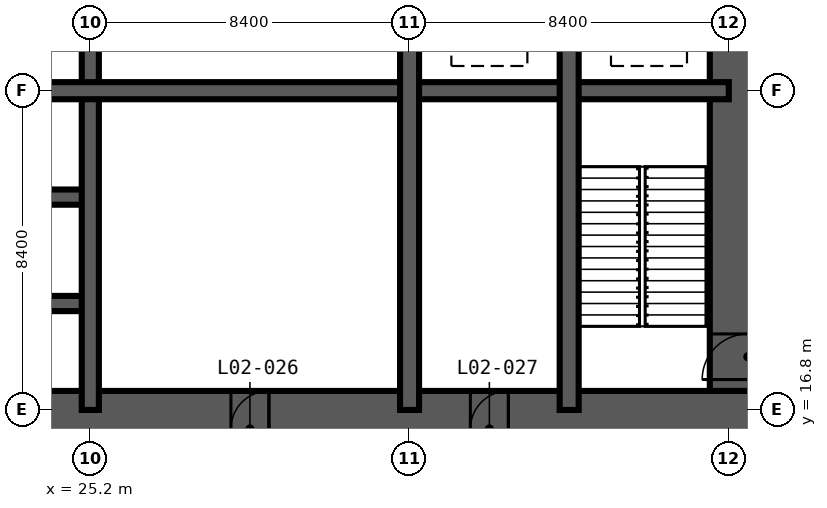
"""IFC4 building model, lengths in metres.
Left out: names, types, materials, properties, quantities, classifications, styles, units other than length and angle.
Written with IfcOpenShell. Run it as: python <this file> out.ifc"""

import sys

from ifc_helpers import new_model, si_unit, direction, frame, frame_2d, origin, place, context, subcontext, project, spatial, rectangle, extrude, element, fill, save


model = new_model("IFC4")
c1 = context("Model", 3, precision=1e-05, world=origin(), true_north=direction((0.0, 1.0)))
c2 = subcontext(c1, "Body", "Model", "MODEL_VIEW")
j1 = project(units=[si_unit("LENGTHUNIT", "METRE"), si_unit("PLANEANGLEUNIT", "RADIAN")], contexts=[c1])
p1 = place(None, origin())
s1 = spatial("IfcSite", under=j1, at=p1, CompositionType="ELEMENT")
p2 = place(p1, origin())
s2 = spatial("IfcBuilding", under=s1, at=p2, CompositionType="ELEMENT")
p3 = place(p2, frame((0.0, 0.0, 12.0)))
s3 = spatial("IfcBuildingStorey", under=s2, at=p3, CompositionType="ELEMENT", Elevation=12.0)
p4 = place(p3, frame((15.3, 16.3, -0.3), z_axis=(0.0, 0.0, 1.0), x_axis=(1.0, 0.0, 0.0)))
e1 = element("IfcWall", 1, at=p4, inside=s3, PredefinedType="SHEAR", context=c2, shape_type="SweptSolid", body=[
    extrude(rectangle(XDim=28.2, YDim=2.0, at=frame_2d((14.1, 0.0))), origin(), (0.0, 0.0, 1.0), 5.0),
])
p5 = place(p4, frame((13.6, 0.0, 0.3)))
e2 = element("IfcOpeningElement", 2, at=p5, cuts=e1, PredefinedType="OPENING", context=c2, shape_type="SweptSolid", body=[
    extrude(rectangle(XDim=1.0, YDim=2.1, at=frame_2d((0.5, 1.05))), frame((0.0, 1.01, 0.0), z_axis=(0.0, -1.0, 0.0), x_axis=(1.0, 0.0, 0.0)), (0.0, 0.0, 1.0), 2.02),
])
p6 = place(p4, frame((19.9, 0.0, 0.3)))
e3 = element("IfcOpeningElement", 3, at=p6, cuts=e1, PredefinedType="OPENING", context=c2, shape_type="SweptSolid", body=[
    extrude(rectangle(XDim=1.0, YDim=2.1, at=frame_2d((0.5, 1.05))), frame((0.0, 1.01, 0.0), z_axis=(0.0, -1.0, 0.0), x_axis=(1.0, 0.0, 0.0)), (0.0, 0.0, 1.0), 2.02),
])
p7 = place(p3, frame((42.5, 17.3, -0.3), z_axis=(0.0, 0.0, 1.0), x_axis=(0.0, 1.0, 0.0)))
e4 = element("IfcWall", 4, at=p7, inside=s3, PredefinedType="SHEAR", context=c2, shape_type="SweptSolid", body=[
    extrude(rectangle(XDim=24.2, YDim=2.0, at=frame_2d((12.1, 0.0))), origin(), (0.0, 0.0, 1.0), 5.0),
])
p8 = place(p7, frame((0.3, 0.0, 0.3)))
e5 = element("IfcOpeningElement", 5, at=p8, cuts=e4, PredefinedType="OPENING", context=c2, shape_type="SweptSolid", body=[
    extrude(rectangle(XDim=1.2, YDim=2.2, at=frame_2d((0.6, 1.1))), frame((0.0, 1.01, 0.0), z_axis=(0.0, -1.0, 0.0), x_axis=(1.0, 0.0, 0.0)), (0.0, 0.0, 1.0), 2.02),
])
p9 = place(p7, frame((11.6, 0.0, 0.3)))
e6 = element("IfcOpeningElement", 6, at=p9, cuts=e4, PredefinedType="OPENING", context=c2, shape_type="SweptSolid", body=[
    extrude(rectangle(XDim=1.0, YDim=2.1, at=frame_2d((0.5, 1.05))), frame((0.0, 1.01, 0.0), z_axis=(0.0, -1.0, 0.0), x_axis=(1.0, 0.0, 0.0)), (0.0, 0.0, 1.0), 2.02),
])
p10 = place(p7, frame((20.0, 0.0, 0.3)))
e7 = element("IfcOpeningElement", 7, at=p10, cuts=e4, PredefinedType="OPENING", context=c2, shape_type="SweptSolid", body=[
    extrude(rectangle(XDim=1.0, YDim=2.1, at=frame_2d((0.5, 1.05))), frame((0.0, 1.01, 0.0), z_axis=(0.0, -1.0, 0.0), x_axis=(1.0, 0.0, 0.0)), (0.0, 0.0, 1.0), 2.02),
])
for number, where, z_axis, x_axis in (
    (8, (16.8, 19.6, -0.3), (0.0, 0.0, 1.0), (1.0, 0.0, 0.0)),
    (9, (16.8, 22.4, -0.3), (0.0, 0.0, 1.0), (1.0, 0.0, 0.0)),
):
    element("IfcWall", number, at=place(p3, frame(where, z_axis=z_axis, x_axis=x_axis)), inside=s3, PredefinedType="SHEAR", context=c2, shape_type="SweptSolid", body=[
        extrude(rectangle(XDim=8.4, YDim=0.4, at=frame_2d((4.2, 0.0))), origin(), (0.0, 0.0, 1.0), 5.0),
    ])
for number, where, z_axis, x_axis in (
    (10, (25.2, 16.8, -0.3), (0.0, 0.0, 1.0), (0.0, 1.0, 0.0)),
    (11, (16.8, 25.2, -0.3), (0.0, 0.0, 1.0), (1.0, 0.0, 0.0)),
):
    element("IfcWall", number, at=place(p3, frame(where, z_axis=z_axis, x_axis=x_axis)), inside=s3, PredefinedType="SHEAR", context=c2, shape_type="SweptSolid", body=[
        extrude(rectangle(XDim=25.2, YDim=0.45, at=frame_2d((12.6, 0.0))), origin(), (0.0, 0.0, 1.0), 5.0),
    ])
p11 = place(p3, frame((33.6, 16.8, -0.3), z_axis=(0.0, 0.0, 1.0), x_axis=(0.0, 1.0, 0.0)))
e12 = element("IfcWall", 12, at=p11, inside=s3, PredefinedType="SHEAR", context=c2, shape_type="SweptSolid", body=[
    extrude(rectangle(XDim=25.2, YDim=0.5, at=frame_2d((12.6, 0.0))), origin(), (0.0, 0.0, 1.0), 5.0),
])
p12 = place(p11, frame((22.5, 0.0, 0.3)))
e13 = element("IfcOpeningElement", 13, at=p12, cuts=e12, PredefinedType="OPENING", context=c2, shape_type="SweptSolid", body=[
    extrude(rectangle(XDim=1.2, YDim=2.2, at=frame_2d((0.6, 1.1))), frame((0.0, 0.26, 0.0), z_axis=(0.0, -1.0, 0.0), x_axis=(1.0, 0.0, 0.0)), (0.0, 0.0, 1.0), 0.52),
])
p13 = place(p11, frame((18.3, 0.0, 0.3)))
e14 = element("IfcOpeningElement", 14, at=p13, cuts=e12, PredefinedType="OPENING", context=c2, shape_type="SweptSolid", body=[
    extrude(rectangle(XDim=1.2, YDim=2.2, at=frame_2d((0.6, 1.1))), frame((0.0, 0.26, 0.0), z_axis=(0.0, -1.0, 0.0), x_axis=(1.0, 0.0, 0.0)), (0.0, 0.0, 1.0), 0.52),
])
p14 = place(p11, frame((12.1, 0.0, 0.3)))
e15 = element("IfcOpeningElement", 15, at=p14, cuts=e12, PredefinedType="OPENING", context=c2, shape_type="SweptSolid", body=[
    extrude(rectangle(XDim=1.0, YDim=2.1, at=frame_2d((0.5, 1.05))), frame((0.0, 0.26, 0.0), z_axis=(0.0, -1.0, 0.0), x_axis=(1.0, 0.0, 0.0)), (0.0, 0.0, 1.0), 0.52),
])
p15 = place(p3, frame((37.8, 16.8, -0.3), z_axis=(0.0, 0.0, 1.0), x_axis=(0.0, 1.0, 0.0)))
e16 = element("IfcWall", 16, at=p15, inside=s3, PredefinedType="SHEAR", context=c2, shape_type="SweptSolid", body=[
    extrude(rectangle(XDim=11.2, YDim=0.5, at=frame_2d((5.6, 0.0))), origin(), (0.0, 0.0, 1.0), 5.0),
])
p16 = place(p8, origin())
e17 = element("IfcDoor", 17, at=p16, inside=s3, OperationType="SINGLE_SWING_LEFT", PredefinedType="DOOR", context=c2, shape_type="SweptSolid", body=[
    extrude(rectangle(XDim=1.2, YDim=2.2, at=frame_2d((0.6, 1.1))), frame((0.0, 0.025, 0.0), z_axis=(0.0, -1.0, 0.0), x_axis=(1.0, 0.0, 0.0)), (0.0, 0.0, 1.0), 0.05),
])
fill(e5, e17)
p17 = place(p5, origin())
e18 = element("IfcDoor", 18, at=p17, inside=s3, OperationType="SINGLE_SWING_RIGHT", PredefinedType="DOOR", context=c2, shape_type="SweptSolid", body=[
    extrude(rectangle(XDim=1.0, YDim=2.1, at=frame_2d((0.5, 1.05))), frame((0.0, 0.025, 0.0), z_axis=(0.0, -1.0, 0.0), x_axis=(1.0, 0.0, 0.0)), (0.0, 0.0, 1.0), 0.05),
])
fill(e2, e18)
p18 = place(p6, origin())
e19 = element("IfcDoor", 19, at=p18, inside=s3, OperationType="SINGLE_SWING_RIGHT", PredefinedType="DOOR", context=c2, shape_type="SweptSolid", body=[
    extrude(rectangle(XDim=1.0, YDim=2.1, at=frame_2d((0.5, 1.05))), frame((0.0, 0.025, 0.0), z_axis=(0.0, -1.0, 0.0), x_axis=(1.0, 0.0, 0.0)), (0.0, 0.0, 1.0), 0.05),
])
fill(e3, e19)
save(model, sys.argv[1])
